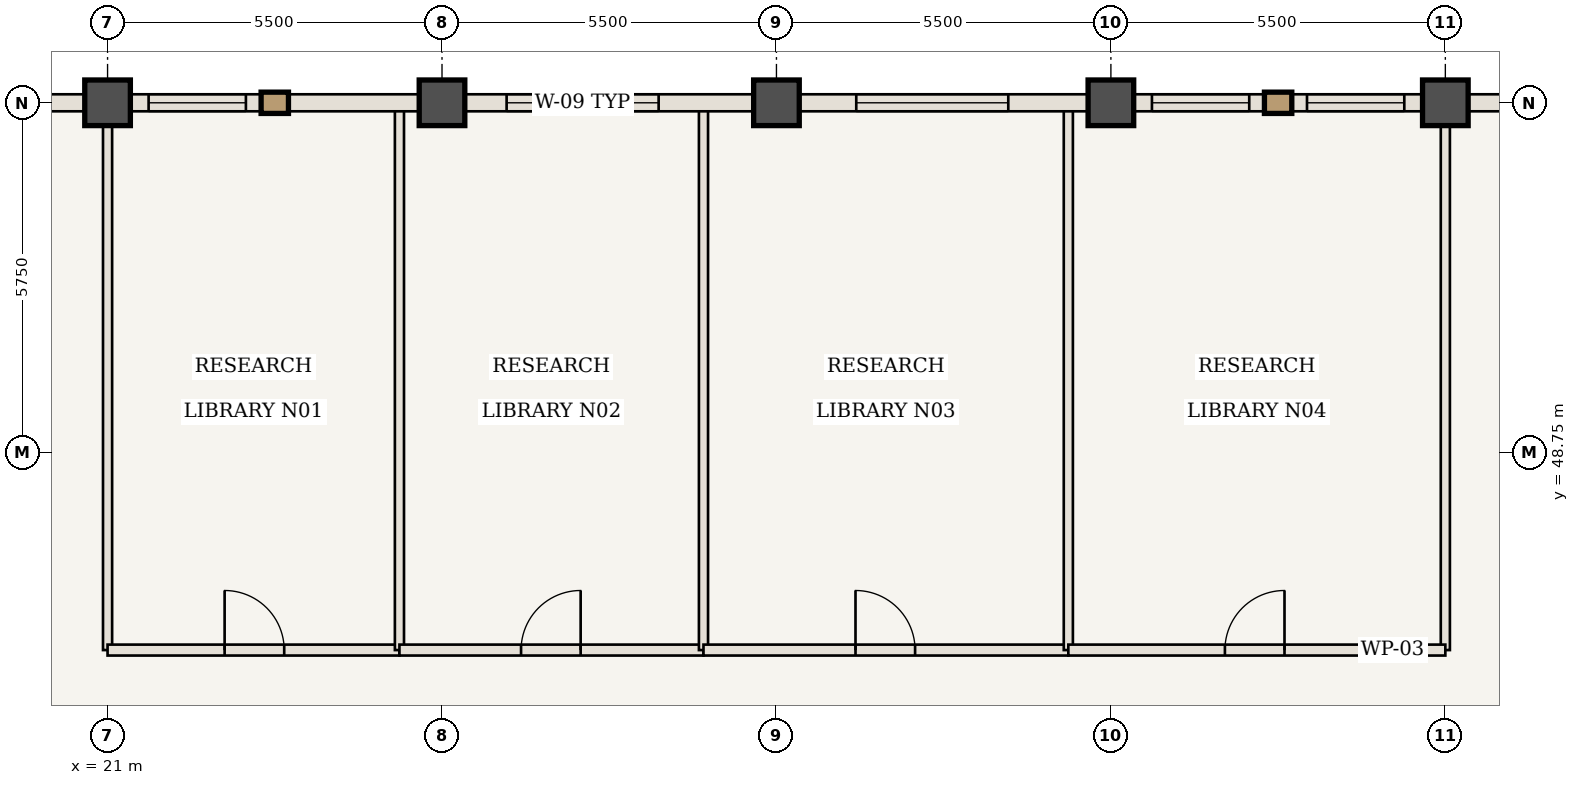
"""IFC4 building model, lengths in metres.
Left out: names, types, materials, properties, quantities, classifications, styles, units other than length and angle.
Written with IfcOpenShell. Run it as: python <this file> out.ifc"""

import sys

from ifc_helpers import new_model, si_unit, direction, frame, frame_2d, origin, origin_2d, place, context, subcontext, project, spatial, rectangle, extrude, element, fill, save


model = new_model("IFC4")
c1 = context("Model", 3, precision=1e-05, world=origin(), true_north=direction((0.0, 1.0)))
c2 = subcontext(c1, "Body", "Model", "MODEL_VIEW")
j1 = project(units=[si_unit("LENGTHUNIT", "METRE"), si_unit("PLANEANGLEUNIT", "RADIAN")], contexts=[c1])
p1 = place(None, origin())
s1 = spatial("IfcSite", under=j1, at=p1, CompositionType="ELEMENT")
p2 = place(p1, origin())
s2 = spatial("IfcBuilding", under=s1, at=p2, CompositionType="ELEMENT")
p3 = place(p2, frame((0.0, 0.0, 289.1)))
s3 = spatial("IfcBuildingStorey", under=s2, at=p3, CompositionType="ELEMENT", Elevation=289.1)
for number, where, z_axis, x_axis in (
    (1, (21.0, 54.5, 0.0), (0.0, 0.0, 1.0), (1.0, 0.0, 0.0)),
    (2, (26.5, 54.5, 0.0), (0.0, 0.0, 1.0), (1.0, 0.0, 0.0)),
    (3, (32.0, 54.5, 0.0), (0.0, 0.0, 1.0), (1.0, 0.0, 0.0)),
    (4, (37.5, 54.5, 0.0), (0.0, 0.0, 1.0), (1.0, 0.0, 0.0)),
    (5, (43.0, 54.5, 0.0), (0.0, 0.0, 1.0), (1.0, 0.0, 0.0)),
):
    element("IfcColumn", number, at=place(p3, frame(where, z_axis=z_axis, x_axis=x_axis)), inside=s3, PredefinedType="COLUMN", context=c2, shape_type="SweptSolid", body=[
        extrude(rectangle(XDim=0.75, YDim=0.75, at=origin_2d()), origin(), (0.0, 0.0, 1.0), 3.85),
    ])
for number, where, z_axis, x_axis in (
    (6, (21.0, 45.5, 0.0), (0.0, 0.0, 1.0), (0.0, 1.0, 0.0)),
    (7, (43.0, 45.5, 0.0), (0.0, 0.0, 1.0), (0.0, 1.0, 0.0)),
):
    element("IfcWall", number, at=place(p3, frame(where, z_axis=z_axis, x_axis=x_axis)), inside=s3, PredefinedType="STANDARD", context=c2, shape_type="SweptSolid", body=[
        extrude(rectangle(XDim=8.94, YDim=0.15, at=frame_2d((4.47, 0.0))), origin(), (0.0, 0.0, 1.0), 3.685),
    ])
p4 = place(p3, frame((21.0, 45.5, 0.0), z_axis=(0.0, 0.0, 1.0), x_axis=(1.0, 0.0, 0.0)))
e8 = element("IfcWall", 8, at=p4, inside=s3, PredefinedType="STANDARD", context=c2, shape_type="SweptSolid", body=[
    extrude(rectangle(XDim=4.8, YDim=0.18, at=frame_2d((2.4, 0.0))), origin(), (0.0, 0.0, 1.0), 3.685),
])
p5 = place(p4, frame((1.925, 0.0, 0.0)))
e9 = element("IfcOpeningElement", 9, at=p5, cuts=e8, PredefinedType="OPENING", context=c2, shape_type="SweptSolid", body=[
    extrude(rectangle(XDim=0.98, YDim=2.2, at=frame_2d((0.49, 1.1))), frame((0.0, 0.1, 0.0), z_axis=(0.0, -1.0, 0.0), x_axis=(1.0, 0.0, 0.0)), (0.0, 0.0, 1.0), 0.2),
])
p6 = place(p3, frame((25.8, 45.5, 0.0), z_axis=(0.0, 0.0, 1.0), x_axis=(0.0, 1.0, 0.0)))
e10 = element("IfcWall", 10, at=p6, inside=s3, PredefinedType="STANDARD", context=c2, shape_type="SweptSolid", body=[
    extrude(rectangle(XDim=8.94, YDim=0.15, at=frame_2d((4.47, 0.0))), origin(), (0.0, 0.0, 1.0), 3.685),
])
p7 = place(p3, frame((25.8, 45.5, 0.0), z_axis=(0.0, 0.0, 1.0), x_axis=(1.0, 0.0, 0.0)))
e11 = element("IfcWall", 11, at=p7, inside=s3, PredefinedType="STANDARD", context=c2, shape_type="SweptSolid", body=[
    extrude(rectangle(XDim=5.0, YDim=0.18, at=frame_2d((2.5, 0.0))), origin(), (0.0, 0.0, 1.0), 3.685),
])
p8 = place(p7, frame((2.0, 0.0, 0.0)))
e12 = element("IfcOpeningElement", 12, at=p8, cuts=e11, PredefinedType="OPENING", context=c2, shape_type="SweptSolid", body=[
    extrude(rectangle(XDim=0.98, YDim=2.2, at=frame_2d((0.49, 1.1))), frame((0.0, 0.1, 0.0), z_axis=(0.0, -1.0, 0.0), x_axis=(1.0, 0.0, 0.0)), (0.0, 0.0, 1.0), 0.2),
])
p9 = place(p3, frame((30.8, 45.5, 0.0), z_axis=(0.0, 0.0, 1.0), x_axis=(0.0, 1.0, 0.0)))
e13 = element("IfcWall", 13, at=p9, inside=s3, PredefinedType="STANDARD", context=c2, shape_type="SweptSolid", body=[
    extrude(rectangle(XDim=8.94, YDim=0.15, at=frame_2d((4.47, 0.0))), origin(), (0.0, 0.0, 1.0), 3.685),
])
p10 = place(p3, frame((30.8, 45.5, 0.0), z_axis=(0.0, 0.0, 1.0), x_axis=(1.0, 0.0, 0.0)))
e14 = element("IfcWall", 14, at=p10, inside=s3, PredefinedType="STANDARD", context=c2, shape_type="SweptSolid", body=[
    extrude(rectangle(XDim=6.0, YDim=0.18, at=frame_2d((3.0, 0.0))), origin(), (0.0, 0.0, 1.0), 3.685),
])
p11 = place(p10, frame((2.5, 0.0, 0.0)))
e15 = element("IfcOpeningElement", 15, at=p11, cuts=e14, PredefinedType="OPENING", context=c2, shape_type="SweptSolid", body=[
    extrude(rectangle(XDim=0.98, YDim=2.2, at=frame_2d((0.49, 1.1))), frame((0.0, 0.1, 0.0), z_axis=(0.0, -1.0, 0.0), x_axis=(1.0, 0.0, 0.0)), (0.0, 0.0, 1.0), 0.2),
])
p12 = place(p3, frame((36.8, 45.5, 0.0), z_axis=(0.0, 0.0, 1.0), x_axis=(0.0, 1.0, 0.0)))
e16 = element("IfcWall", 16, at=p12, inside=s3, PredefinedType="STANDARD", context=c2, shape_type="SweptSolid", body=[
    extrude(rectangle(XDim=8.94, YDim=0.15, at=frame_2d((4.47, 0.0))), origin(), (0.0, 0.0, 1.0), 3.685),
])
p13 = place(p3, frame((36.8, 45.5, 0.0), z_axis=(0.0, 0.0, 1.0), x_axis=(1.0, 0.0, 0.0)))
e17 = element("IfcWall", 17, at=p13, inside=s3, PredefinedType="STANDARD", context=c2, shape_type="SweptSolid", body=[
    extrude(rectangle(XDim=6.2, YDim=0.18, at=frame_2d((3.1, 0.0))), origin(), (0.0, 0.0, 1.0), 3.685),
])
p14 = place(p13, frame((2.575, 0.0, 0.0)))
e18 = element("IfcOpeningElement", 18, at=p14, cuts=e17, PredefinedType="OPENING", context=c2, shape_type="SweptSolid", body=[
    extrude(rectangle(XDim=0.98, YDim=2.2, at=frame_2d((0.49, 1.1))), frame((0.0, 0.1, 0.0), z_axis=(0.0, -1.0, 0.0), x_axis=(1.0, 0.0, 0.0)), (0.0, 0.0, 1.0), 0.2),
])
p15 = place(p3, frame((15.5, 54.5, 0.0), z_axis=(0.0, 0.0, 1.0), x_axis=(1.0, 0.0, 0.0)))
e19 = element("IfcWall", 19, at=p15, inside=s3, PredefinedType="USERDEFINED", context=c2, shape_type="SweptSolid", body=[
    extrude(rectangle(XDim=5.5, YDim=0.28, at=frame_2d((2.75, 0.0))), origin(), (0.0, 0.0, 1.0), 2.985),
])
p16 = place(p3, frame((21.0, 54.5, 0.0), z_axis=(0.0, 0.0, 1.0), x_axis=(1.0, 0.0, 0.0)))
e20 = element("IfcWall", 20, at=p16, inside=s3, PredefinedType="USERDEFINED", context=c2, shape_type="SweptSolid", body=[
    extrude(rectangle(XDim=5.5, YDim=0.28, at=frame_2d((2.75, 0.0))), origin(), (0.0, 0.0, 1.0), 2.985),
])
p17 = place(p16, frame((0.675, 0.0, 0.85)))
e21 = element("IfcOpeningElement", 21, at=p17, cuts=e20, PredefinedType="OPENING", context=c2, shape_type="SweptSolid", body=[
    extrude(rectangle(XDim=1.6, YDim=1.935, at=frame_2d((0.8, 0.968))), frame((0.0, 0.15, 0.0), z_axis=(0.0, -1.0, 0.0), x_axis=(1.0, 0.0, 0.0)), (0.0, 0.0, 1.0), 0.3),
])
p18 = place(p3, frame((26.5, 54.5, 0.0), z_axis=(0.0, 0.0, 1.0), x_axis=(1.0, 0.0, 0.0)))
e22 = element("IfcWall", 22, at=p18, inside=s3, PredefinedType="USERDEFINED", context=c2, shape_type="SweptSolid", body=[
    extrude(rectangle(XDim=5.5, YDim=0.28, at=frame_2d((2.75, 0.0))), origin(), (0.0, 0.0, 1.0), 2.985),
])
p19 = place(p18, frame((1.062, 0.0, 0.85)))
e23 = element("IfcOpeningElement", 23, at=p19, cuts=e22, PredefinedType="OPENING", context=c2, shape_type="SweptSolid", body=[
    extrude(rectangle(XDim=2.5, YDim=1.935, at=frame_2d((1.25, 0.968))), frame((0.0, 0.15, 0.0), z_axis=(0.0, -1.0, 0.0), x_axis=(1.0, 0.0, 0.0)), (0.0, 0.0, 1.0), 0.3),
])
p20 = place(p3, frame((32.0, 54.5, 0.0), z_axis=(0.0, 0.0, 1.0), x_axis=(1.0, 0.0, 0.0)))
e24 = element("IfcWall", 24, at=p20, inside=s3, PredefinedType="USERDEFINED", context=c2, shape_type="SweptSolid", body=[
    extrude(rectangle(XDim=5.5, YDim=0.28, at=frame_2d((2.75, 0.0))), origin(), (0.0, 0.0, 1.0), 2.985),
])
p21 = place(p20, frame((1.312, 0.0, 0.85)))
e25 = element("IfcOpeningElement", 25, at=p21, cuts=e24, PredefinedType="OPENING", context=c2, shape_type="SweptSolid", body=[
    extrude(rectangle(XDim=2.5, YDim=1.935, at=frame_2d((1.25, 0.968))), frame((0.0, 0.15, 0.0), z_axis=(0.0, -1.0, 0.0), x_axis=(1.0, 0.0, 0.0)), (0.0, 0.0, 1.0), 0.3),
])
p22 = place(p3, frame((37.5, 54.5, 0.0), z_axis=(0.0, 0.0, 1.0), x_axis=(1.0, 0.0, 0.0)))
e26 = element("IfcWall", 26, at=p22, inside=s3, PredefinedType="USERDEFINED", context=c2, shape_type="SweptSolid", body=[
    extrude(rectangle(XDim=5.5, YDim=0.28, at=frame_2d((2.75, 0.0))), origin(), (0.0, 0.0, 1.0), 2.985),
])
p23 = place(p22, frame((0.675, 0.0, 0.85)))
e27 = element("IfcOpeningElement", 27, at=p23, cuts=e26, PredefinedType="OPENING", context=c2, shape_type="SweptSolid", body=[
    extrude(rectangle(XDim=1.6, YDim=1.935, at=frame_2d((0.8, 0.968))), frame((0.0, 0.15, 0.0), z_axis=(0.0, -1.0, 0.0), x_axis=(1.0, 0.0, 0.0)), (0.0, 0.0, 1.0), 0.3),
])
p24 = place(p22, frame((3.225, 0.0, 0.85)))
e28 = element("IfcOpeningElement", 28, at=p24, cuts=e26, PredefinedType="OPENING", context=c2, shape_type="SweptSolid", body=[
    extrude(rectangle(XDim=1.6, YDim=1.935, at=frame_2d((0.8, 0.968))), frame((0.0, 0.15, 0.0), z_axis=(0.0, -1.0, 0.0), x_axis=(1.0, 0.0, 0.0)), (0.0, 0.0, 1.0), 0.3),
])
p25 = place(p3, frame((43.0, 54.5, 0.0), z_axis=(0.0, 0.0, 1.0), x_axis=(1.0, 0.0, 0.0)))
e29 = element("IfcWall", 29, at=p25, inside=s3, PredefinedType="USERDEFINED", context=c2, shape_type="SweptSolid", body=[
    extrude(rectangle(XDim=5.5, YDim=0.28, at=frame_2d((2.75, 0.0))), origin(), (0.0, 0.0, 1.0), 2.985),
])
p26 = place(p5, origin())
e30 = element("IfcDoor", 30, at=p26, inside=s3, OperationType="SINGLE_SWING_LEFT", PredefinedType="DOOR", context=c2, shape_type="SweptSolid", body=[
    extrude(rectangle(XDim=0.98, YDim=2.2, at=frame_2d((0.49, 1.1))), frame((0.0, 0.025, 0.0), z_axis=(0.0, -1.0, 0.0), x_axis=(1.0, 0.0, 0.0)), (0.0, 0.0, 1.0), 0.05),
])
fill(e9, e30)
p27 = place(p8, origin())
e31 = element("IfcDoor", 31, at=p27, inside=s3, OperationType="SINGLE_SWING_RIGHT", PredefinedType="DOOR", context=c2, shape_type="SweptSolid", body=[
    extrude(rectangle(XDim=0.98, YDim=2.2, at=frame_2d((0.49, 1.1))), frame((0.0, 0.025, 0.0), z_axis=(0.0, -1.0, 0.0), x_axis=(1.0, 0.0, 0.0)), (0.0, 0.0, 1.0), 0.05),
])
fill(e12, e31)
p28 = place(p11, origin())
e32 = element("IfcDoor", 32, at=p28, inside=s3, OperationType="SINGLE_SWING_LEFT", PredefinedType="DOOR", context=c2, shape_type="SweptSolid", body=[
    extrude(rectangle(XDim=0.98, YDim=2.2, at=frame_2d((0.49, 1.1))), frame((0.0, 0.025, 0.0), z_axis=(0.0, -1.0, 0.0), x_axis=(1.0, 0.0, 0.0)), (0.0, 0.0, 1.0), 0.05),
])
fill(e15, e32)
p29 = place(p14, origin())
e33 = element("IfcDoor", 33, at=p29, inside=s3, OperationType="SINGLE_SWING_RIGHT", PredefinedType="DOOR", context=c2, shape_type="SweptSolid", body=[
    extrude(rectangle(XDim=0.98, YDim=2.2, at=frame_2d((0.49, 1.1))), frame((0.0, 0.025, 0.0), z_axis=(0.0, -1.0, 0.0), x_axis=(1.0, 0.0, 0.0)), (0.0, 0.0, 1.0), 0.05),
])
fill(e18, e33)
p30 = place(p17, origin())
e34 = element("IfcWindow", 34, at=p30, inside=s3, PartitioningType="SINGLE_PANEL", PredefinedType="WINDOW", context=c2, shape_type="SweptSolid", body=[
    extrude(rectangle(XDim=1.6, YDim=1.935, at=frame_2d((0.8, 0.968))), frame((0.0, 0.03, 0.0), z_axis=(0.0, -1.0, 0.0), x_axis=(1.0, 0.0, 0.0)), (0.0, 0.0, 1.0), 0.06),
])
fill(e21, e34)
p31 = place(p19, origin())
e35 = element("IfcWindow", 35, at=p31, inside=s3, PartitioningType="SINGLE_PANEL", PredefinedType="WINDOW", context=c2, shape_type="SweptSolid", body=[
    extrude(rectangle(XDim=2.5, YDim=1.935, at=frame_2d((1.25, 0.968))), frame((0.0, 0.03, 0.0), z_axis=(0.0, -1.0, 0.0), x_axis=(1.0, 0.0, 0.0)), (0.0, 0.0, 1.0), 0.06),
])
fill(e23, e35)
p32 = place(p21, origin())
e36 = element("IfcWindow", 36, at=p32, inside=s3, PartitioningType="SINGLE_PANEL", PredefinedType="WINDOW", context=c2, shape_type="SweptSolid", body=[
    extrude(rectangle(XDim=2.5, YDim=1.935, at=frame_2d((1.25, 0.968))), frame((0.0, 0.03, 0.0), z_axis=(0.0, -1.0, 0.0), x_axis=(1.0, 0.0, 0.0)), (0.0, 0.0, 1.0), 0.06),
])
fill(e25, e36)
p33 = place(p23, origin())
e37 = element("IfcWindow", 37, at=p33, inside=s3, PartitioningType="SINGLE_PANEL", PredefinedType="WINDOW", context=c2, shape_type="SweptSolid", body=[
    extrude(rectangle(XDim=1.6, YDim=1.935, at=frame_2d((0.8, 0.968))), frame((0.0, 0.03, 0.0), z_axis=(0.0, -1.0, 0.0), x_axis=(1.0, 0.0, 0.0)), (0.0, 0.0, 1.0), 0.06),
])
fill(e27, e37)
p34 = place(p24, origin())
e38 = element("IfcWindow", 38, at=p34, inside=s3, PartitioningType="SINGLE_PANEL", PredefinedType="WINDOW", context=c2, shape_type="SweptSolid", body=[
    extrude(rectangle(XDim=1.6, YDim=1.935, at=frame_2d((0.8, 0.968))), frame((0.0, 0.03, 0.0), z_axis=(0.0, -1.0, 0.0), x_axis=(1.0, 0.0, 0.0)), (0.0, 0.0, 1.0), 0.06),
])
fill(e28, e38)
save(model, sys.argv[1])
